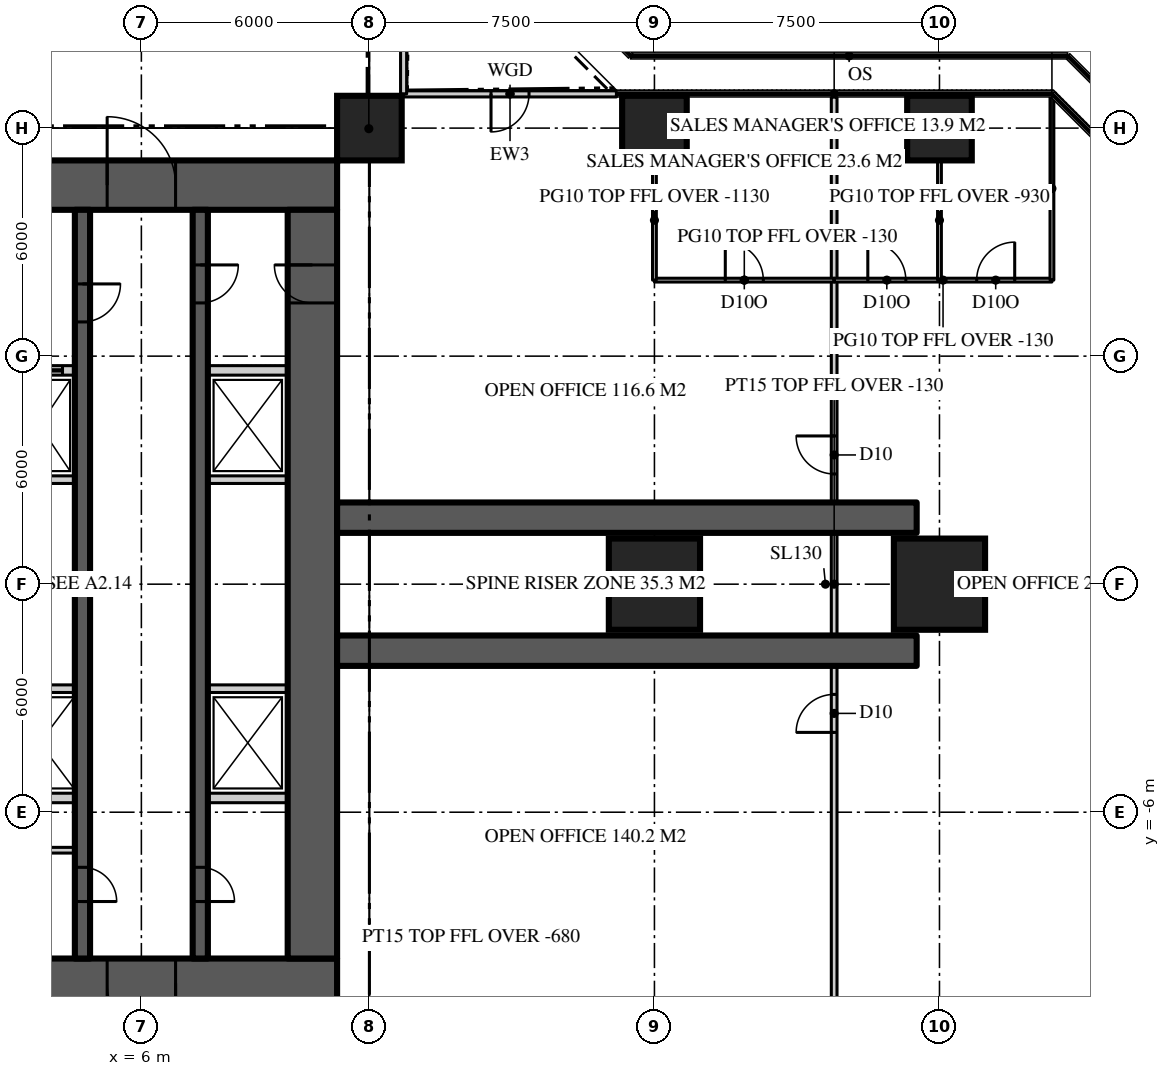
"""IFC4 building model, lengths in metres.
Left out: names, types, materials, properties, quantities, classifications, styles, units other than length and angle.
Written with IfcOpenShell. Run it as: python <this file> out.ifc"""

import sys

from ifc_helpers import new_model, si_unit, direction, frame, frame_2d, origin, origin_2d, place, context, subcontext, project, spatial, rectangle, extrude, element, fill, save


model = new_model("IFC4")
c1 = context("Model", 3, precision=1e-05, world=origin(), true_north=direction((0.0, 1.0)))
c2 = subcontext(c1, "Body", "Model", "MODEL_VIEW")
j1 = project(units=[si_unit("LENGTHUNIT", "METRE"), si_unit("PLANEANGLEUNIT", "RADIAN")], contexts=[c1])
p1 = place(None, origin())
s1 = spatial("IfcSite", under=j1, at=p1, CompositionType="ELEMENT")
p2 = place(p1, origin())
s2 = spatial("IfcBuilding", under=s1, at=p2, CompositionType="ELEMENT")
p3 = place(p2, frame((0.0, 0.0, 98.1)))
s3 = spatial("IfcBuildingStorey", under=s2, at=p3, CompositionType="ELEMENT", Elevation=98.1)
p4 = place(p3, frame((-11.15, 10.5, 0.0), z_axis=(0.0, 0.0, 1.0), x_axis=(1.0, 0.0, 0.0)))
e1 = element("IfcWall", 1, at=p4, inside=s3, PredefinedType="SHEAR", context=c2, shape_type="SweptSolid", body=[
    extrude(rectangle(XDim=22.3, YDim=1.3, at=frame_2d((11.15, 0.0))), origin(), (0.0, 0.0, 1.0), 3.9),
])
p5 = place(p4, frame((4.25, 0.0, 0.0)))
e2 = element("IfcOpeningElement", 2, at=p5, cuts=e1, PredefinedType="OPENING", context=c2, shape_type="SweptSolid", body=[
    extrude(rectangle(XDim=1.8, YDim=2.2, at=frame_2d((0.9, 1.1))), frame((0.0, 0.66, 0.0), z_axis=(0.0, -1.0, 0.0), x_axis=(1.0, 0.0, 0.0)), (0.0, 0.0, 1.0), 1.32),
])
p6 = place(p4, frame((16.25, 0.0, 0.0)))
e3 = element("IfcOpeningElement", 3, at=p6, cuts=e1, PredefinedType="OPENING", context=c2, shape_type="SweptSolid", body=[
    extrude(rectangle(XDim=1.8, YDim=2.2, at=frame_2d((0.9, 1.1))), frame((0.0, 0.66, 0.0), z_axis=(0.0, -1.0, 0.0), x_axis=(1.0, 0.0, 0.0)), (0.0, 0.0, 1.0), 1.32),
])
p7 = place(p3, frame((11.15, -10.5, 0.0), z_axis=(0.0, 0.0, 1.0), x_axis=(-1.0, 0.0, 0.0)))
e4 = element("IfcWall", 4, at=p7, inside=s3, PredefinedType="SHEAR", context=c2, shape_type="SweptSolid", body=[
    extrude(rectangle(XDim=22.3, YDim=1.3, at=frame_2d((11.15, 0.0))), origin(), (0.0, 0.0, 1.0), 3.9),
])
p8 = place(p7, frame((16.25, 0.0, 0.0)))
e5 = element("IfcOpeningElement", 5, at=p8, cuts=e4, PredefinedType="OPENING", context=c2, shape_type="SweptSolid", body=[
    extrude(rectangle(XDim=1.8, YDim=2.2, at=frame_2d((0.9, 1.1))), frame((0.0, 0.66, 0.0), z_axis=(0.0, -1.0, 0.0), x_axis=(1.0, 0.0, 0.0)), (0.0, 0.0, 1.0), 1.32),
])
p9 = place(p7, frame((4.25, 0.0, 0.0)))
e6 = element("IfcOpeningElement", 6, at=p9, cuts=e4, PredefinedType="OPENING", context=c2, shape_type="SweptSolid", body=[
    extrude(rectangle(XDim=1.8, YDim=2.2, at=frame_2d((0.9, 1.1))), frame((0.0, 0.66, 0.0), z_axis=(0.0, -1.0, 0.0), x_axis=(1.0, 0.0, 0.0)), (0.0, 0.0, 1.0), 1.32),
])
p10 = place(p3, frame((10.5, -9.85, 0.0), z_axis=(0.0, 0.0, 1.0), x_axis=(0.0, 1.0, 0.0)))
e7 = element("IfcWall", 7, at=p10, inside=s3, PredefinedType="SHEAR", context=c2, shape_type="SweptSolid", body=[
    extrude(rectangle(XDim=19.7, YDim=1.3, at=frame_2d((9.85, 0.0))), origin(), (0.0, 0.0, 1.0), 3.9),
])
p11 = place(p10, frame((17.25, 0.0, 0.0)))
e8 = element("IfcOpeningElement", 8, at=p11, cuts=e7, PredefinedType="OPENING", context=c2, shape_type="SweptSolid", body=[
    extrude(rectangle(XDim=1.0, YDim=2.2, at=frame_2d((0.5, 1.1))), frame((0.0, 0.66, 0.0), z_axis=(0.0, -1.0, 0.0), x_axis=(1.0, 0.0, 0.0)), (0.0, 0.0, 1.0), 1.32),
])
for number, where, z_axis, x_axis in (
    (9, (11.15, -1.75, 0.0), (0.0, 0.0, 1.0), (1.0, 0.0, 0.0)),
    (10, (11.15, 1.75, 0.0), (0.0, 0.0, 1.0), (1.0, 0.0, 0.0)),
):
    element("IfcWall", number, at=place(p3, frame(where, z_axis=z_axis, x_axis=x_axis)), inside=s3, PredefinedType="SHEAR", context=c2, shape_type="SweptSolid", body=[
        extrude(rectangle(XDim=15.25, YDim=0.8, at=frame_2d((7.625, 0.0))), origin(), (0.0, 0.0, 1.0), 3.9),
    ])
for number, where, z_axis, x_axis in (
    (11, (19.5, 0.0, 0.0), (0.0, 0.0, 1.0), (1.0, 0.0, 0.0)),
    (12, (27.0, 0.0, 0.0), (0.0, 0.0, 1.0), (1.0, 0.0, 0.0)),
):
    element("IfcColumn", number, at=place(p3, frame(where, z_axis=z_axis, x_axis=x_axis)), inside=s3, PredefinedType="COLUMN", context=c2, shape_type="SweptSolid", body=[
        extrude(rectangle(XDim=2.4, YDim=2.4, at=origin_2d()), origin(), (0.0, 0.0, 1.0), 3.9),
    ])
for number, where, z_axis, x_axis in (
    (13, (12.0, 12.0, 0.0), (0.0, 0.0, 1.0), (1.0, 0.0, 0.0)),
    (14, (19.5, 12.0, 0.0), (0.0, 0.0, 1.0), (1.0, 0.0, 0.0)),
    (15, (27.0, 12.0, 0.0), (0.0, 0.0, 1.0), (1.0, 0.0, 0.0)),
):
    element("IfcColumn", number, at=place(p3, frame(where, z_axis=z_axis, x_axis=x_axis)), inside=s3, PredefinedType="COLUMN", context=c2, shape_type="SweptSolid", body=[
        extrude(rectangle(XDim=1.7, YDim=1.7, at=origin_2d()), origin(), (0.0, 0.0, 1.0), 3.9),
    ])
p12 = place(p3, frame((18.5, 12.9, 0.0), z_axis=(0.0, 0.0, 1.0), x_axis=(-1.0, 0.0, 0.0)))
e16 = element("IfcWall", 16, at=p12, inside=s3, PredefinedType="SOLIDWALL", context=c2, shape_type="SweptSolid", body=[
    extrude(rectangle(XDim=5.6, YDim=0.16, at=frame_2d((2.8, 0.0))), origin(), (0.0, 0.0, 1.0), 3.77),
])
p13 = place(p12, frame((2.3, 0.0, 0.0)))
e17 = element("IfcOpeningElement", 17, at=p13, cuts=e16, PredefinedType="OPENING", context=c2, shape_type="SweptSolid", body=[
    extrude(rectangle(XDim=1.0, YDim=2.2, at=frame_2d((0.5, 1.1))), frame((0.0, 0.09, 0.0), z_axis=(0.0, -1.0, 0.0), x_axis=(1.0, 0.0, 0.0)), (0.0, 0.0, 1.0), 0.18),
])
p14 = place(p3, frame((12.9, 12.9, 0.0), z_axis=(0.0, 0.0, 1.0), x_axis=(0.0, 1.0, 0.0)))
e18 = element("IfcWall", 18, at=p14, inside=s3, PredefinedType="SOLIDWALL", context=c2, shape_type="SweptSolid", body=[
    extrude(rectangle(XDim=5.6, YDim=0.16, at=frame_2d((2.8, 0.0))), origin(), (0.0, 0.0, 1.0), 3.77),
])
p15 = place(p3, frame((7.55, 9.85, 0.0), z_axis=(0.0, 0.0, 1.0), x_axis=(0.0, -1.0, 0.0)))
e19 = element("IfcWall", 19, at=p15, inside=s3, PredefinedType="SHEAR", context=c2, shape_type="SweptSolid", body=[
    extrude(rectangle(XDim=19.7, YDim=0.4, at=frame_2d((9.85, 0.0))), origin(), (0.0, 0.0, 1.0), 3.9),
])
p16 = place(p15, frame((1.45, 0.0, 0.0)))
e20 = element("IfcOpeningElement", 20, at=p16, cuts=e19, PredefinedType="OPENING", context=c2, shape_type="SweptSolid", body=[
    extrude(rectangle(XDim=1.0, YDim=2.2, at=frame_2d((0.5, 1.1))), frame((0.0, 0.21, 0.0), z_axis=(0.0, -1.0, 0.0), x_axis=(1.0, 0.0, 0.0)), (0.0, 0.0, 1.0), 0.42),
])
p17 = place(p15, frame((17.3, 0.0, 0.0)))
e21 = element("IfcOpeningElement", 21, at=p17, cuts=e19, PredefinedType="OPENING", context=c2, shape_type="SweptSolid", body=[
    extrude(rectangle(XDim=0.9, YDim=2.1, at=frame_2d((0.45, 1.05))), frame((0.0, 0.21, 0.0), z_axis=(0.0, -1.0, 0.0), x_axis=(1.0, 0.0, 0.0)), (0.0, 0.0, 1.0), 0.42),
])
p18 = place(p3, frame((4.45, 9.85, 0.0), z_axis=(0.0, 0.0, 1.0), x_axis=(0.0, -1.0, 0.0)))
e22 = element("IfcWall", 22, at=p18, inside=s3, PredefinedType="SHEAR", context=c2, shape_type="SweptSolid", body=[
    extrude(rectangle(XDim=19.7, YDim=0.4, at=frame_2d((9.85, 0.0))), origin(), (0.0, 0.0, 1.0), 3.9),
])
p19 = place(p18, frame((1.95, 0.0, 0.0)))
e23 = element("IfcOpeningElement", 23, at=p19, cuts=e22, PredefinedType="OPENING", context=c2, shape_type="SweptSolid", body=[
    extrude(rectangle(XDim=1.0, YDim=2.2, at=frame_2d((0.5, 1.1))), frame((0.0, 0.21, 0.0), z_axis=(0.0, -1.0, 0.0), x_axis=(1.0, 0.0, 0.0)), (0.0, 0.0, 1.0), 0.42),
])
p20 = place(p18, frame((17.3, 0.0, 0.0)))
e24 = element("IfcOpeningElement", 24, at=p20, cuts=e22, PredefinedType="OPENING", context=c2, shape_type="SweptSolid", body=[
    extrude(rectangle(XDim=0.9, YDim=2.1, at=frame_2d((0.45, 1.05))), frame((0.0, 0.21, 0.0), z_axis=(0.0, -1.0, 0.0), x_axis=(1.0, 0.0, 0.0)), (0.0, 0.0, 1.0), 0.42),
])
p21 = place(p3, frame((2.4, 5.625, 0.0), z_axis=(0.0, 0.0, 1.0), x_axis=(1.0, 0.0, 0.0)))
e25 = element("IfcWall", 25, at=p21, inside=s3, PredefinedType="SOLIDWALL", context=c2, shape_type="SweptSolid", body=[
    extrude(rectangle(XDim=1.85, YDim=0.25, at=frame_2d((0.925, 0.0))), origin(), (0.0, 0.0, 1.0), 3.7),
])
p22 = place(p21, frame((0.325, 0.0, 0.0)))
e26 = element("IfcOpeningElement", 26, at=p22, cuts=e25, PredefinedType="OPENING", context=c2, shape_type="SweptSolid", body=[
    extrude(rectangle(XDim=1.2, YDim=2.2, at=frame_2d((0.6, 1.1))), frame((0.0, 0.135, 0.0), z_axis=(0.0, -1.0, 0.0), x_axis=(1.0, 0.0, 0.0)), (0.0, 0.0, 1.0), 0.27),
])
p23 = place(p3, frame((7.75, 5.625, 0.0), z_axis=(0.0, 0.0, 1.0), x_axis=(1.0, 0.0, 0.0)))
e27 = element("IfcWall", 27, at=p23, inside=s3, PredefinedType="SOLIDWALL", context=c2, shape_type="SweptSolid", body=[
    extrude(rectangle(XDim=2.1, YDim=0.25, at=frame_2d((1.05, 0.0))), origin(), (0.0, 0.0, 1.0), 3.7),
])
p24 = place(p3, frame((2.4, -5.625, 0.0), z_axis=(0.0, 0.0, 1.0), x_axis=(1.0, 0.0, 0.0)))
e28 = element("IfcWall", 28, at=p24, inside=s3, PredefinedType="SOLIDWALL", context=c2, shape_type="SweptSolid", body=[
    extrude(rectangle(XDim=1.85, YDim=0.25, at=frame_2d((0.925, 0.0))), origin(), (0.0, 0.0, 1.0), 3.7),
])
p25 = place(p3, frame((7.75, -5.625, 0.0), z_axis=(0.0, 0.0, 1.0), x_axis=(1.0, 0.0, 0.0)))
e29 = element("IfcWall", 29, at=p25, inside=s3, PredefinedType="SOLIDWALL", context=c2, shape_type="SweptSolid", body=[
    extrude(rectangle(XDim=2.1, YDim=0.25, at=frame_2d((1.05, 0.0))), origin(), (0.0, 0.0, 1.0), 3.7),
])
p26 = place(p3, frame((2.4, -2.75, 0.0), z_axis=(0.0, 0.0, 1.0), x_axis=(1.0, 0.0, 0.0)))
e30 = element("IfcWall", 30, at=p26, inside=s3, PredefinedType="SOLIDWALL", context=c2, shape_type="SweptSolid", body=[
    extrude(rectangle(XDim=1.85, YDim=0.2, at=frame_2d((0.925, 0.0))), origin(), (0.0, 0.0, 1.0), 3.7),
])
p27 = place(p3, frame((7.75, -2.75, 0.0), z_axis=(0.0, 0.0, 1.0), x_axis=(1.0, 0.0, 0.0)))
e31 = element("IfcWall", 31, at=p27, inside=s3, PredefinedType="SOLIDWALL", context=c2, shape_type="SweptSolid", body=[
    extrude(rectangle(XDim=2.1, YDim=0.2, at=frame_2d((1.05, 0.0))), origin(), (0.0, 0.0, 1.0), 3.7),
])
p28 = place(p3, frame((2.4, 2.75, 0.0), z_axis=(0.0, 0.0, 1.0), x_axis=(1.0, 0.0, 0.0)))
e32 = element("IfcWall", 32, at=p28, inside=s3, PredefinedType="SOLIDWALL", context=c2, shape_type="SweptSolid", body=[
    extrude(rectangle(XDim=1.85, YDim=0.2, at=frame_2d((0.925, 0.0))), origin(), (0.0, 0.0, 1.0), 3.7),
])
p29 = place(p3, frame((7.75, 2.75, 0.0), z_axis=(0.0, 0.0, 1.0), x_axis=(1.0, 0.0, 0.0)))
e33 = element("IfcWall", 33, at=p29, inside=s3, PredefinedType="SOLIDWALL", context=c2, shape_type="SweptSolid", body=[
    extrude(rectangle(XDim=2.1, YDim=0.2, at=frame_2d((1.05, 0.0))), origin(), (0.0, 0.0, 1.0), 3.7),
])
p30 = place(p3, frame((24.229, -12.82, 0.0), z_axis=(0.0, 0.0, 1.0), x_axis=(0.0, 1.0, 0.0)))
e34 = element("IfcWall", 34, at=p30, inside=s3, PredefinedType="PARTITIONING", context=c2, shape_type="SweptSolid", body=[
    extrude(rectangle(XDim=25.64, YDim=0.15, at=frame_2d((12.82, 0.0))), origin(), (0.0, 0.0, 1.0), 3.77),
])
p31 = place(p30, frame((15.72, 0.0, 0.0)))
e35 = element("IfcOpeningElement", 35, at=p31, cuts=e34, PredefinedType="OPENING", context=c2, shape_type="SweptSolid", body=[
    extrude(rectangle(XDim=1.0, YDim=2.2, at=frame_2d((0.5, 1.1))), frame((0.0, 0.085, 0.0), z_axis=(0.0, -1.0, 0.0), x_axis=(1.0, 0.0, 0.0)), (0.0, 0.0, 1.0), 0.17),
])
p32 = place(p30, frame((8.92, 0.0, 0.0)))
e36 = element("IfcOpeningElement", 36, at=p32, cuts=e34, PredefinedType="OPENING", context=c2, shape_type="SweptSolid", body=[
    extrude(rectangle(XDim=1.0, YDim=2.2, at=frame_2d((0.5, 1.1))), frame((0.0, 0.085, 0.0), z_axis=(0.0, -1.0, 0.0), x_axis=(1.0, 0.0, 0.0)), (0.0, 0.0, 1.0), 0.17),
])
p33 = place(p3, frame((19.5, 8.0, 0.0), z_axis=(0.0, 0.0, 1.0), x_axis=(1.0, 0.0, 0.0)))
e37 = element("IfcWall", 37, at=p33, inside=s3, PredefinedType="PARTITIONING", context=c2, shape_type="SweptSolid", body=[
    extrude(rectangle(XDim=4.729, YDim=0.1, at=frame_2d((2.365, 0.0))), origin(), (0.0, 0.0, 1.0), 3.77),
])
p34 = place(p33, frame((1.865, 0.0, 0.0)))
e38 = element("IfcOpeningElement", 38, at=p34, cuts=e37, PredefinedType="OPENING", context=c2, shape_type="SweptSolid", body=[
    extrude(rectangle(XDim=1.0, YDim=2.2, at=frame_2d((0.5, 1.1))), frame((0.0, 0.06, 0.0), z_axis=(0.0, -1.0, 0.0), x_axis=(1.0, 0.0, 0.0)), (0.0, 0.0, 1.0), 0.12),
])
p35 = place(p3, frame((24.229, 8.0, 0.0), z_axis=(0.0, 0.0, 1.0), x_axis=(1.0, 0.0, 0.0)))
e39 = element("IfcWall", 39, at=p35, inside=s3, PredefinedType="PARTITIONING", context=c2, shape_type="SweptSolid", body=[
    extrude(rectangle(XDim=5.73, YDim=0.1, at=frame_2d((2.865, 0.0))), origin(), (0.0, 0.0, 1.0), 3.77),
])
p36 = place(p35, frame((0.885, 0.0, 0.0)))
e40 = element("IfcOpeningElement", 40, at=p36, cuts=e39, PredefinedType="OPENING", context=c2, shape_type="SweptSolid", body=[
    extrude(rectangle(XDim=1.0, YDim=2.2, at=frame_2d((0.5, 1.1))), frame((0.0, 0.06, 0.0), z_axis=(0.0, -1.0, 0.0), x_axis=(1.0, 0.0, 0.0)), (0.0, 0.0, 1.0), 0.12),
])
p37 = place(p35, frame((3.75, 0.0, 0.0)))
e41 = element("IfcOpeningElement", 41, at=p37, cuts=e39, PredefinedType="OPENING", context=c2, shape_type="SweptSolid", body=[
    extrude(rectangle(XDim=1.0, YDim=2.2, at=frame_2d((0.5, 1.1))), frame((0.0, 0.06, 0.0), z_axis=(0.0, -1.0, 0.0), x_axis=(1.0, 0.0, 0.0)), (0.0, 0.0, 1.0), 0.12),
])
p38 = place(p3, frame((19.5, 8.0, 0.0), z_axis=(0.0, 0.0, 1.0), x_axis=(0.0, 1.0, 0.0)))
e42 = element("IfcWall", 42, at=p38, inside=s3, PredefinedType="PARTITIONING", context=c2, shape_type="SweptSolid", body=[
    extrude(rectangle(XDim=3.15, YDim=0.1, at=frame_2d((1.575, 0.0))), origin(), (0.0, 0.0, 1.0), 2.77),
])
p39 = place(p3, frame((27.0, 8.0, 0.0), z_axis=(0.0, 0.0, 1.0), x_axis=(0.0, 1.0, 0.0)))
e43 = element("IfcWall", 43, at=p39, inside=s3, PredefinedType="PARTITIONING", context=c2, shape_type="SweptSolid", body=[
    extrude(rectangle(XDim=3.15, YDim=0.1, at=frame_2d((1.575, 0.0))), origin(), (0.0, 0.0, 1.0), 2.97),
])
p40 = place(p3, frame((29.959, 8.0, 0.0), z_axis=(0.0, 0.0, 1.0), x_axis=(0.0, 1.0, 0.0)))
e44 = element("IfcWall", 44, at=p40, inside=s3, PredefinedType="PARTITIONING", context=c2, shape_type="SweptSolid", body=[
    extrude(rectangle(XDim=4.82, YDim=0.1, at=frame_2d((2.41, 0.0))), origin(), (0.0, 0.0, 1.0), 3.77),
])
p41 = place(p3, frame((11.15, 11.15, 0.0), z_axis=(0.0, 0.0, 1.0), x_axis=(0.707106781187, 0.707106781187, 0.0)))
e45 = element("IfcWall", 45, at=p41, inside=s3, PredefinedType="PARTITIONING", context=c2, shape_type="SweptSolid", body=[
    extrude(rectangle(XDim=2.362, YDim=0.15, at=frame_2d((1.181, 0.0))), origin(), (0.0, 0.0, 1.0), 3.22),
])
p42 = place(p3, frame((2.4, -7.0, 0.0), z_axis=(0.0, 0.0, 1.0), x_axis=(1.0, 0.0, 0.0)))
e46 = element("IfcWall", 46, at=p42, inside=s3, PredefinedType="SOLIDWALL", context=c2, shape_type="SweptSolid", body=[
    extrude(rectangle(XDim=1.85, YDim=0.15, at=frame_2d((0.925, 0.0))), origin(), (0.0, 0.0, 1.0), 3.77),
])
p43 = place(p42, frame((0.1, 0.0, 0.0)))
e47 = element("IfcOpeningElement", 47, at=p43, cuts=e46, PredefinedType="OPENING", context=c2, shape_type="SweptSolid", body=[
    extrude(rectangle(XDim=0.9, YDim=2.1, at=frame_2d((0.45, 1.05))), frame((0.0, 0.085, 0.0), z_axis=(0.0, -1.0, 0.0), x_axis=(1.0, 0.0, 0.0)), (0.0, 0.0, 1.0), 0.17),
])
p44 = place(p13, origin())
e48 = element("IfcDoor", 48, at=p44, inside=s3, OperationType="SINGLE_SWING_RIGHT", PredefinedType="DOOR", context=c2, shape_type="SweptSolid", body=[
    extrude(rectangle(XDim=1.0, YDim=2.2, at=frame_2d((0.5, 1.1))), frame((0.0, 0.025, 0.0), z_axis=(0.0, -1.0, 0.0), x_axis=(1.0, 0.0, 0.0)), (0.0, 0.0, 1.0), 0.05),
])
fill(e17, e48)
p45 = place(p6, origin())
e49 = element("IfcDoor", 49, at=p45, inside=s3, OperationType="DOUBLE_DOOR_DOUBLE_SWING", PredefinedType="DOOR", context=c2, shape_type="SweptSolid", body=[
    extrude(rectangle(XDim=1.8, YDim=2.2, at=frame_2d((0.9, 1.1))), frame((0.0, 0.025, 0.0), z_axis=(0.0, -1.0, 0.0), x_axis=(1.0, 0.0, 0.0)), (0.0, 0.0, 1.0), 0.05),
])
fill(e3, e49)
p46 = place(p9, origin())
e50 = element("IfcDoor", 50, at=p46, inside=s3, OperationType="DOUBLE_DOOR_DOUBLE_SWING", PredefinedType="DOOR", context=c2, shape_type="SweptSolid", body=[
    extrude(rectangle(XDim=1.8, YDim=2.2, at=frame_2d((0.9, 1.1))), frame((0.0, 0.025, 0.0), z_axis=(0.0, -1.0, 0.0), x_axis=(1.0, 0.0, 0.0)), (0.0, 0.0, 1.0), 0.05),
])
fill(e6, e50)
p47 = place(p16, origin())
e51 = element("IfcDoor", 51, at=p47, inside=s3, OperationType="SINGLE_SWING_LEFT", PredefinedType="DOOR", context=c2, shape_type="SweptSolid", body=[
    extrude(rectangle(XDim=1.0, YDim=2.2, at=frame_2d((0.5, 1.1))), frame((0.0, 0.025, 0.0), z_axis=(0.0, -1.0, 0.0), x_axis=(1.0, 0.0, 0.0)), (0.0, 0.0, 1.0), 0.05),
])
fill(e20, e51)
p48 = place(p11, origin())
e52 = element("IfcDoor", 52, at=p48, inside=s3, OperationType="SINGLE_SWING_RIGHT", PredefinedType="DOOR", context=c2, shape_type="SweptSolid", body=[
    extrude(rectangle(XDim=1.0, YDim=2.2, at=frame_2d((0.5, 1.1))), frame((0.0, 0.025, 0.0), z_axis=(0.0, -1.0, 0.0), x_axis=(1.0, 0.0, 0.0)), (0.0, 0.0, 1.0), 0.05),
])
fill(e8, e52)
p49 = place(p19, origin())
e53 = element("IfcDoor", 53, at=p49, inside=s3, OperationType="SINGLE_SWING_LEFT", PredefinedType="DOOR", context=c2, shape_type="SweptSolid", body=[
    extrude(rectangle(XDim=1.0, YDim=2.2, at=frame_2d((0.5, 1.1))), frame((0.0, 0.025, 0.0), z_axis=(0.0, -1.0, 0.0), x_axis=(1.0, 0.0, 0.0)), (0.0, 0.0, 1.0), 0.05),
])
fill(e23, e53)
p50 = place(p17, origin())
e54 = element("IfcDoor", 54, at=p50, inside=s3, OperationType="SINGLE_SWING_RIGHT", PredefinedType="DOOR", context=c2, shape_type="SweptSolid", body=[
    extrude(rectangle(XDim=0.9, YDim=2.1, at=frame_2d((0.45, 1.05))), frame((0.0, 0.025, 0.0), z_axis=(0.0, -1.0, 0.0), x_axis=(1.0, 0.0, 0.0)), (0.0, 0.0, 1.0), 0.05),
])
fill(e21, e54)
p51 = place(p20, origin())
e55 = element("IfcDoor", 55, at=p51, inside=s3, OperationType="SINGLE_SWING_RIGHT", PredefinedType="DOOR", context=c2, shape_type="SweptSolid", body=[
    extrude(rectangle(XDim=0.9, YDim=2.1, at=frame_2d((0.45, 1.05))), frame((0.0, 0.025, 0.0), z_axis=(0.0, -1.0, 0.0), x_axis=(1.0, 0.0, 0.0)), (0.0, 0.0, 1.0), 0.05),
])
fill(e24, e55)
p52 = place(p22, origin())
e56 = element("IfcDoor", 56, at=p52, inside=s3, OperationType="SLIDING_TO_LEFT", PredefinedType="DOOR", context=c2, shape_type="SweptSolid", body=[
    extrude(rectangle(XDim=1.2, YDim=2.2, at=frame_2d((0.6, 1.1))), frame((0.0, 0.025, 0.0), z_axis=(0.0, -1.0, 0.0), x_axis=(1.0, 0.0, 0.0)), (0.0, 0.0, 1.0), 0.05),
])
fill(e26, e56)
p53 = place(p31, origin())
e57 = element("IfcDoor", 57, at=p53, inside=s3, OperationType="SINGLE_SWING_RIGHT", PredefinedType="DOOR", context=c2, shape_type="SweptSolid", body=[
    extrude(rectangle(XDim=1.0, YDim=2.2, at=frame_2d((0.5, 1.1))), frame((0.0, 0.025, 0.0), z_axis=(0.0, -1.0, 0.0), x_axis=(1.0, 0.0, 0.0)), (0.0, 0.0, 1.0), 0.05),
])
fill(e35, e57)
p54 = place(p32, origin())
e58 = element("IfcDoor", 58, at=p54, inside=s3, OperationType="SINGLE_SWING_LEFT", PredefinedType="DOOR", context=c2, shape_type="SweptSolid", body=[
    extrude(rectangle(XDim=1.0, YDim=2.2, at=frame_2d((0.5, 1.1))), frame((0.0, 0.025, 0.0), z_axis=(0.0, -1.0, 0.0), x_axis=(1.0, 0.0, 0.0)), (0.0, 0.0, 1.0), 0.05),
])
fill(e36, e58)
p55 = place(p34, origin())
e59 = element("IfcDoor", 59, at=p55, inside=s3, OperationType="SINGLE_SWING_LEFT", PredefinedType="DOOR", context=c2, shape_type="SweptSolid", body=[
    extrude(rectangle(XDim=1.0, YDim=2.2, at=frame_2d((0.5, 1.1))), frame((0.0, 0.025, 0.0), z_axis=(0.0, -1.0, 0.0), x_axis=(1.0, 0.0, 0.0)), (0.0, 0.0, 1.0), 0.05),
])
fill(e38, e59)
p56 = place(p36, origin())
e60 = element("IfcDoor", 60, at=p56, inside=s3, OperationType="SINGLE_SWING_LEFT", PredefinedType="DOOR", context=c2, shape_type="SweptSolid", body=[
    extrude(rectangle(XDim=1.0, YDim=2.2, at=frame_2d((0.5, 1.1))), frame((0.0, 0.025, 0.0), z_axis=(0.0, -1.0, 0.0), x_axis=(1.0, 0.0, 0.0)), (0.0, 0.0, 1.0), 0.05),
])
fill(e40, e60)
p57 = place(p37, origin())
e61 = element("IfcDoor", 61, at=p57, inside=s3, OperationType="SINGLE_SWING_RIGHT", PredefinedType="DOOR", context=c2, shape_type="SweptSolid", body=[
    extrude(rectangle(XDim=1.0, YDim=2.2, at=frame_2d((0.5, 1.1))), frame((0.0, 0.025, 0.0), z_axis=(0.0, -1.0, 0.0), x_axis=(1.0, 0.0, 0.0)), (0.0, 0.0, 1.0), 0.05),
])
fill(e41, e61)
save(model, sys.argv[1])
